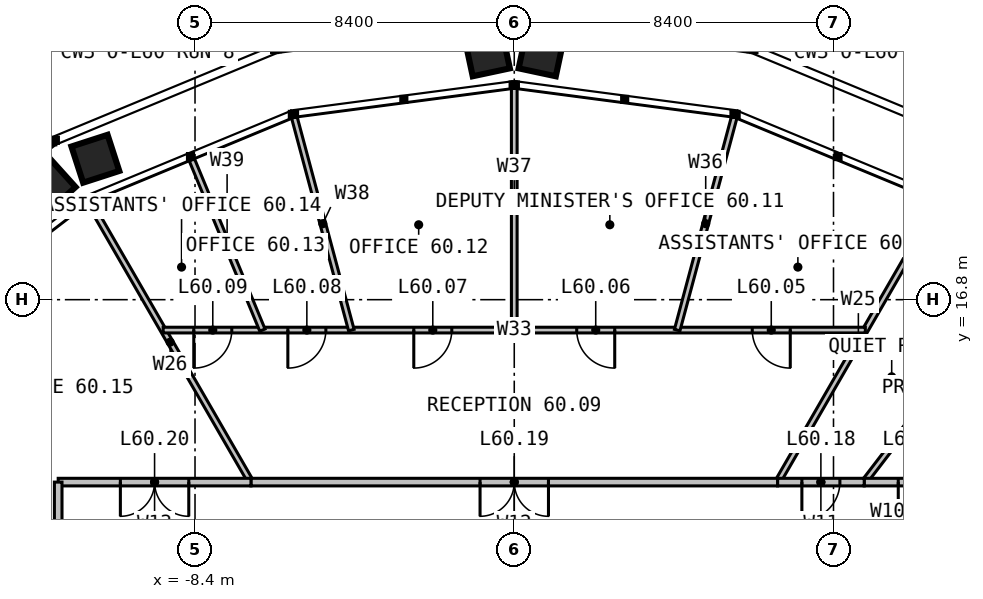
"""IFC4 building model, lengths in metres.
Left out: names, types, materials, properties, quantities, classifications, styles, units other than length and angle.
Written with IfcOpenShell. Run it as: python <this file> out.ifc"""

import sys

from ifc_helpers import new_model, si_unit, direction, frame, frame_2d, origin, place, context, subcontext, project, spatial, rectangle, extrude, element, fill, save


model = new_model("IFC4")
c1 = context("Model", 3, precision=1e-05, world=origin(), true_north=direction((0.0, 1.0)))
c2 = subcontext(c1, "Body", "Model", "MODEL_VIEW")
j1 = project(units=[si_unit("LENGTHUNIT", "METRE"), si_unit("PLANEANGLEUNIT", "RADIAN")], contexts=[c1])
p1 = place(None, origin())
s1 = spatial("IfcSite", under=j1, at=p1, CompositionType="ELEMENT")
p2 = place(p1, origin())
s2 = spatial("IfcBuilding", under=s1, at=p2, CompositionType="ELEMENT")
p3 = place(p2, frame((0.0, 0.0, 248.0)))
s3 = spatial("IfcBuildingStorey", under=s2, at=p3, CompositionType="ELEMENT", Elevation=248.0)
p4 = place(p3, frame((9.208, 12.0, 0.0), z_axis=(0.0, 0.0, 1.0), x_axis=(0.608742186743, 0.79336810503, 0.0)))
e1 = element("IfcWall", 1, at=p4, inside=s3, PredefinedType="PARTITIONING", context=c2, shape_type="SweptSolid", body=[
    extrude(rectangle(XDim=7.044, YDim=0.15, at=frame_2d((3.522, 0.0))), origin(), (0.0, 0.0, 1.0), 2.79),
])
for number, where, z_axis, x_axis in (
    (2, (6.928, 12.0, 0.0), (0.0, 0.0, 1.0), (0.5, 0.866, 0.0)),
    (3, (-6.928, 12.0, 0.0), (0.0, 0.0, 1.0), (-0.5, 0.866, 0.0)),
    (4, (-12.0, 6.928, 0.0), (0.0, 0.0, 1.0), (-0.866, 0.5, 0.0)),
):
    element("IfcWall", number, at=place(p3, frame(where, z_axis=z_axis, x_axis=x_axis)), inside=s3, PredefinedType="PARTITIONING", context=c2, shape_type="SweptSolid", body=[
        extrude(rectangle(XDim=8.505, YDim=0.15, at=frame_2d((4.252, 0.0))), origin(), (0.0, 0.0, 1.0), 2.79),
    ])
p5 = place(p3, frame((12.0, 12.0, 0.0), z_axis=(0.0, 0.0, 1.0), x_axis=(-1.0, 0.0, 0.0)))
e5 = element("IfcWall", 5, at=p5, inside=s3, PredefinedType="PARTITIONING", context=c2, shape_type="SweptSolid", body=[
    extrude(rectangle(XDim=2.792, YDim=0.2, at=frame_2d((1.396, 0.0))), origin(), (0.0, 0.0, 1.0), 3.8),
])
p6 = place(p5, frame((0.896, 0.0, 0.0)))
e6 = element("IfcOpeningElement", 6, at=p6, cuts=e5, PredefinedType="OPENING", context=c2, shape_type="SweptSolid", body=[
    extrude(rectangle(XDim=1.0, YDim=2.2, at=frame_2d((0.5, 1.1))), frame((0.0, 0.11, 0.0), z_axis=(0.0, -1.0, 0.0), x_axis=(1.0, 0.0, 0.0)), (0.0, 0.0, 1.0), 0.22),
])
p7 = place(p3, frame((9.208, 12.0, 0.0), z_axis=(0.0, 0.0, 1.0), x_axis=(-1.0, 0.0, 0.0)))
e7 = element("IfcWall", 7, at=p7, inside=s3, PredefinedType="PARTITIONING", context=c2, shape_type="SweptSolid", body=[
    extrude(rectangle(XDim=2.28, YDim=0.2, at=frame_2d((1.14, 0.0))), origin(), (0.0, 0.0, 1.0), 3.8),
])
p8 = place(p7, frame((0.64, 0.0, 0.0)))
e8 = element("IfcOpeningElement", 8, at=p8, cuts=e7, PredefinedType="OPENING", context=c2, shape_type="SweptSolid", body=[
    extrude(rectangle(XDim=1.0, YDim=2.2, at=frame_2d((0.5, 1.1))), frame((0.0, 0.11, 0.0), z_axis=(0.0, -1.0, 0.0), x_axis=(1.0, 0.0, 0.0)), (0.0, 0.0, 1.0), 0.22),
])
p9 = place(p3, frame((9.238, 16.0, 0.0), z_axis=(0.0, 0.0, 1.0), x_axis=(-1.0, 0.0, 0.0)))
e9 = element("IfcWall", 9, at=p9, inside=s3, PredefinedType="PARTITIONING", context=c2, shape_type="SweptSolid", body=[
    extrude(rectangle(XDim=18.475, YDim=0.15, at=frame_2d((9.238, 0.0))), origin(), (0.0, 0.0, 1.0), 2.79),
])
p10 = place(p9, frame((1.975, 0.0, 0.0)))
e10 = element("IfcOpeningElement", 10, at=p10, cuts=e9, PredefinedType="OPENING", context=c2, shape_type="SweptSolid", body=[
    extrude(rectangle(XDim=1.0, YDim=2.2, at=frame_2d((0.5, 1.1))), frame((0.0, 0.085, 0.0), z_axis=(0.0, -1.0, 0.0), x_axis=(1.0, 0.0, 0.0)), (0.0, 0.0, 1.0), 0.17),
])
p11 = place(p9, frame((6.594, 0.0, 0.0)))
e11 = element("IfcOpeningElement", 11, at=p11, cuts=e9, PredefinedType="OPENING", context=c2, shape_type="SweptSolid", body=[
    extrude(rectangle(XDim=1.0, YDim=2.2, at=frame_2d((0.5, 1.1))), frame((0.0, 0.085, 0.0), z_axis=(0.0, -1.0, 0.0), x_axis=(1.0, 0.0, 0.0)), (0.0, 0.0, 1.0), 0.17),
])
p12 = place(p9, frame((10.881, 0.0, 0.0)))
e12 = element("IfcOpeningElement", 12, at=p12, cuts=e9, PredefinedType="OPENING", context=c2, shape_type="SweptSolid", body=[
    extrude(rectangle(XDim=1.0, YDim=2.2, at=frame_2d((0.5, 1.1))), frame((0.0, 0.085, 0.0), z_axis=(0.0, -1.0, 0.0), x_axis=(1.0, 0.0, 0.0)), (0.0, 0.0, 1.0), 0.17),
])
p13 = place(p9, frame((14.195, 0.0, 0.0)))
e13 = element("IfcOpeningElement", 13, at=p13, cuts=e9, PredefinedType="OPENING", context=c2, shape_type="SweptSolid", body=[
    extrude(rectangle(XDim=1.0, YDim=2.2, at=frame_2d((0.5, 1.1))), frame((0.0, 0.085, 0.0), z_axis=(0.0, -1.0, 0.0), x_axis=(1.0, 0.0, 0.0)), (0.0, 0.0, 1.0), 0.17),
])
p14 = place(p9, frame((16.67, 0.0, 0.0)))
e14 = element("IfcOpeningElement", 14, at=p14, cuts=e9, PredefinedType="OPENING", context=c2, shape_type="SweptSolid", body=[
    extrude(rectangle(XDim=1.0, YDim=2.2, at=frame_2d((0.5, 1.1))), frame((0.0, 0.085, 0.0), z_axis=(0.0, -1.0, 0.0), x_axis=(1.0, 0.0, 0.0)), (0.0, 0.0, 1.0), 0.17),
])
p15 = place(p3, frame((4.287, 16.0, 0.0), z_axis=(0.0, 0.0, 1.0), x_axis=(0.258842042881, 0.96591966376, 0.0)))
e15 = element("IfcWall", 15, at=p15, inside=s3, PredefinedType="PARTITIONING", context=c2, shape_type="SweptSolid", body=[
    extrude(rectangle(XDim=5.797, YDim=0.15, at=frame_2d((2.898, 0.0))), origin(), (0.0, 0.0, 1.0), 2.79),
])
p16 = place(p3, frame((0.0, 16.0, 0.0), z_axis=(0.0, 0.0, 1.0), x_axis=(0.0, 1.0, 0.0)))
e16 = element("IfcWall", 16, at=p16, inside=s3, PredefinedType="PARTITIONING", context=c2, shape_type="SweptSolid", body=[
    extrude(rectangle(XDim=6.361, YDim=0.15, at=frame_2d((3.181, 0.0))), origin(), (0.0, 0.0, 1.0), 2.79),
])
p17 = place(p3, frame((-4.287, 16.0, 0.0), z_axis=(0.0, 0.0, 1.0), x_axis=(-0.258842042881, 0.96591966376, 0.0)))
e17 = element("IfcWall", 17, at=p17, inside=s3, PredefinedType="PARTITIONING", context=c2, shape_type="SweptSolid", body=[
    extrude(rectangle(XDim=5.797, YDim=0.15, at=frame_2d((2.898, 0.0))), origin(), (0.0, 0.0, 1.0), 2.79),
])
p18 = place(p3, frame((-6.627, 16.0, 0.0), z_axis=(0.0, 0.0, 1.0), x_axis=(-0.38268510723, 0.923878838758, 0.0)))
e18 = element("IfcWall", 18, at=p18, inside=s3, PredefinedType="PARTITIONING", context=c2, shape_type="SweptSolid", body=[
    extrude(rectangle(XDim=4.852, YDim=0.15, at=frame_2d((2.426, 0.0))), origin(), (0.0, 0.0, 1.0), 2.79),
])
p19 = place(p3, frame((6.928, 12.0, 0.0), z_axis=(0.0, 0.0, 1.0), x_axis=(-1.0, 0.0, 0.0)))
e19 = element("IfcWall", 19, at=p19, inside=s3, PredefinedType="PARTITIONING", context=c2, shape_type="SweptSolid", body=[
    extrude(rectangle(XDim=13.856, YDim=0.2, at=frame_2d((6.928, 0.0))), origin(), (0.0, 0.0, 1.0), 3.8),
])
p20 = place(p19, frame((6.028, 0.0, 0.0)))
e20 = element("IfcOpeningElement", 20, at=p20, cuts=e19, PredefinedType="OPENING", context=c2, shape_type="SweptSolid", body=[
    extrude(rectangle(XDim=1.8, YDim=2.2, at=frame_2d((0.9, 1.1))), frame((0.0, 0.11, 0.0), z_axis=(0.0, -1.0, 0.0), x_axis=(1.0, 0.0, 0.0)), (0.0, 0.0, 1.0), 0.22),
])
p21 = place(p3, frame((-6.928, 12.0, 0.0), z_axis=(0.0, 0.0, 1.0), x_axis=(-1.0, 0.0, 0.0)))
e21 = element("IfcWall", 21, at=p21, inside=s3, PredefinedType="PARTITIONING", context=c2, shape_type="SweptSolid", body=[
    extrude(rectangle(XDim=5.072, YDim=0.2, at=frame_2d((2.536, 0.0))), origin(), (0.0, 0.0, 1.0), 3.8),
])
p22 = place(p21, frame((1.636, 0.0, 0.0)))
e22 = element("IfcOpeningElement", 22, at=p22, cuts=e21, PredefinedType="OPENING", context=c2, shape_type="SweptSolid", body=[
    extrude(rectangle(XDim=1.8, YDim=2.2, at=frame_2d((0.9, 1.1))), frame((0.0, 0.11, 0.0), z_axis=(0.0, -1.0, 0.0), x_axis=(1.0, 0.0, 0.0)), (0.0, 0.0, 1.0), 0.22),
])
p23 = place(p3, frame((-12.0, 12.0, 0.0), z_axis=(0.0, 0.0, 1.0), x_axis=(0.0, -1.0, 0.0)))
e23 = element("IfcWall", 23, at=p23, inside=s3, PredefinedType="PARTITIONING", context=c2, shape_type="SweptSolid", body=[
    extrude(rectangle(XDim=5.072, YDim=0.2, at=frame_2d((2.536, 0.0))), origin(), (0.0, 0.0, 1.0), 3.8),
])
p24 = place(p6, origin())
e24 = element("IfcDoor", 24, at=p24, inside=s3, OperationType="SINGLE_SWING_RIGHT", PredefinedType="DOOR", context=c2, shape_type="SweptSolid", body=[
    extrude(rectangle(XDim=1.0, YDim=2.2, at=frame_2d((0.5, 1.1))), frame((0.0, 0.025, 0.0), z_axis=(0.0, -1.0, 0.0), x_axis=(1.0, 0.0, 0.0)), (0.0, 0.0, 1.0), 0.05),
])
fill(e6, e24)
p25 = place(p8, origin())
e25 = element("IfcDoor", 25, at=p25, inside=s3, OperationType="SINGLE_SWING_RIGHT", PredefinedType="DOOR", context=c2, shape_type="SweptSolid", body=[
    extrude(rectangle(XDim=1.0, YDim=2.2, at=frame_2d((0.5, 1.1))), frame((0.0, 0.025, 0.0), z_axis=(0.0, -1.0, 0.0), x_axis=(1.0, 0.0, 0.0)), (0.0, 0.0, 1.0), 0.05),
])
fill(e8, e25)
p26 = place(p10, origin())
e26 = element("IfcDoor", 26, at=p26, inside=s3, OperationType="SINGLE_SWING_LEFT", PredefinedType="DOOR", context=c2, shape_type="SweptSolid", body=[
    extrude(rectangle(XDim=1.0, YDim=2.2, at=frame_2d((0.5, 1.1))), frame((0.0, 0.025, 0.0), z_axis=(0.0, -1.0, 0.0), x_axis=(1.0, 0.0, 0.0)), (0.0, 0.0, 1.0), 0.05),
])
fill(e10, e26)
p27 = place(p11, origin())
e27 = element("IfcDoor", 27, at=p27, inside=s3, OperationType="SINGLE_SWING_LEFT", PredefinedType="DOOR", context=c2, shape_type="SweptSolid", body=[
    extrude(rectangle(XDim=1.0, YDim=2.2, at=frame_2d((0.5, 1.1))), frame((0.0, 0.025, 0.0), z_axis=(0.0, -1.0, 0.0), x_axis=(1.0, 0.0, 0.0)), (0.0, 0.0, 1.0), 0.05),
])
fill(e11, e27)
p28 = place(p12, origin())
e28 = element("IfcDoor", 28, at=p28, inside=s3, OperationType="SINGLE_SWING_RIGHT", PredefinedType="DOOR", context=c2, shape_type="SweptSolid", body=[
    extrude(rectangle(XDim=1.0, YDim=2.2, at=frame_2d((0.5, 1.1))), frame((0.0, 0.025, 0.0), z_axis=(0.0, -1.0, 0.0), x_axis=(1.0, 0.0, 0.0)), (0.0, 0.0, 1.0), 0.05),
])
fill(e12, e28)
p29 = place(p13, origin())
e29 = element("IfcDoor", 29, at=p29, inside=s3, OperationType="SINGLE_SWING_RIGHT", PredefinedType="DOOR", context=c2, shape_type="SweptSolid", body=[
    extrude(rectangle(XDim=1.0, YDim=2.2, at=frame_2d((0.5, 1.1))), frame((0.0, 0.025, 0.0), z_axis=(0.0, -1.0, 0.0), x_axis=(1.0, 0.0, 0.0)), (0.0, 0.0, 1.0), 0.05),
])
fill(e13, e29)
p30 = place(p14, origin())
e30 = element("IfcDoor", 30, at=p30, inside=s3, OperationType="SINGLE_SWING_RIGHT", PredefinedType="DOOR", context=c2, shape_type="SweptSolid", body=[
    extrude(rectangle(XDim=1.0, YDim=2.2, at=frame_2d((0.5, 1.1))), frame((0.0, 0.025, 0.0), z_axis=(0.0, -1.0, 0.0), x_axis=(1.0, 0.0, 0.0)), (0.0, 0.0, 1.0), 0.05),
])
fill(e14, e30)
p31 = place(p20, origin())
e31 = element("IfcDoor", 31, at=p31, inside=s3, OperationType="DOUBLE_DOOR_SINGLE_SWING", PredefinedType="DOOR", context=c2, shape_type="SweptSolid", body=[
    extrude(rectangle(XDim=1.8, YDim=2.2, at=frame_2d((0.9, 1.1))), frame((0.0, 0.025, 0.0), z_axis=(0.0, -1.0, 0.0), x_axis=(1.0, 0.0, 0.0)), (0.0, 0.0, 1.0), 0.05),
])
fill(e20, e31)
p32 = place(p22, origin())
e32 = element("IfcDoor", 32, at=p32, inside=s3, OperationType="DOUBLE_DOOR_SINGLE_SWING", PredefinedType="DOOR", context=c2, shape_type="SweptSolid", body=[
    extrude(rectangle(XDim=1.8, YDim=2.2, at=frame_2d((0.9, 1.1))), frame((0.0, 0.025, 0.0), z_axis=(0.0, -1.0, 0.0), x_axis=(1.0, 0.0, 0.0)), (0.0, 0.0, 1.0), 0.05),
])
fill(e22, e32)
save(model, sys.argv[1])
